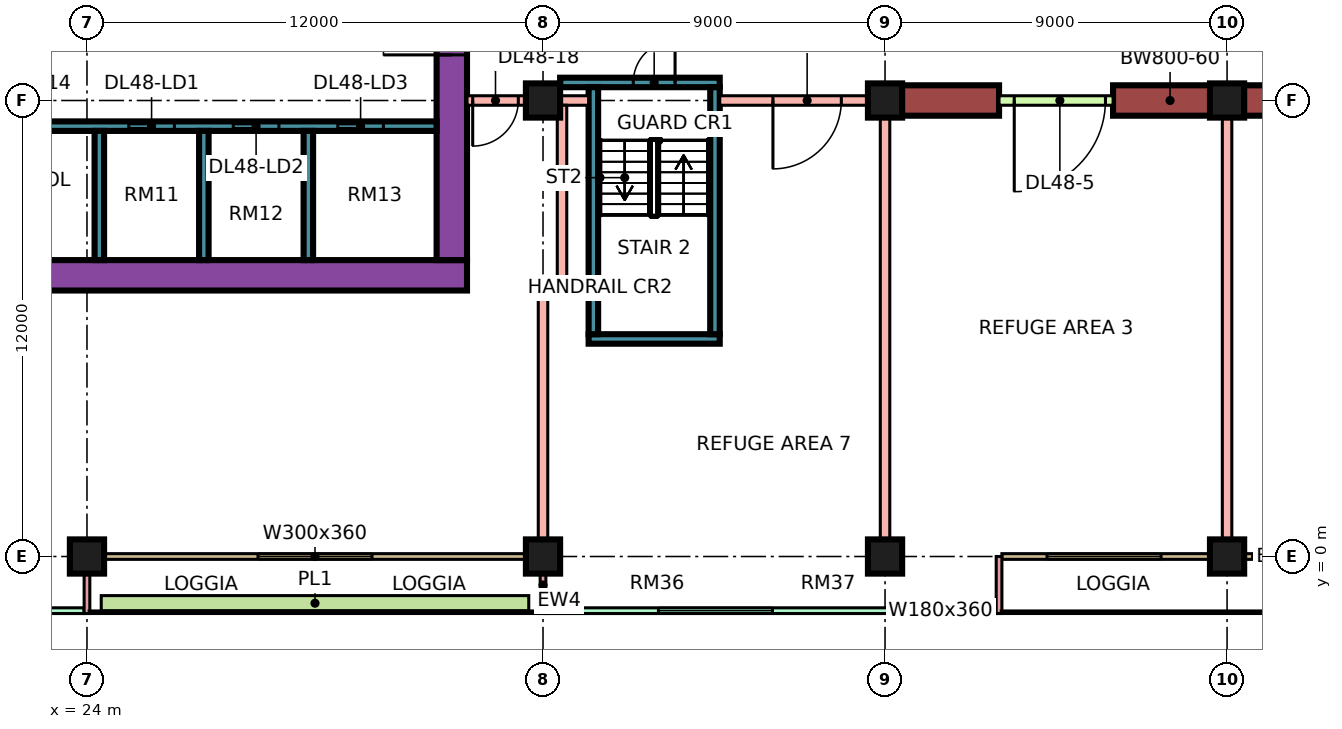
"""IFC4 building model, lengths in metres.
Left out: names, types, materials, properties, quantities, classifications, styles, units other than length and angle.
Written with IfcOpenShell. Run it as: python <this file> out.ifc"""

import sys

from ifc_helpers import new_model, si_unit, direction, frame, frame_2d, origin, origin_2d, place, context, subcontext, project, spatial, rectangle, extrude, element, fill, save


model = new_model("IFC4")
c1 = context("Model", 3, precision=1e-05, world=origin(), true_north=direction((0.0, 1.0)))
c2 = subcontext(c1, "Body", "Model", "MODEL_VIEW")
j1 = project(units=[si_unit("LENGTHUNIT", "METRE"), si_unit("PLANEANGLEUNIT", "RADIAN")], contexts=[c1])
p1 = place(None, origin())
s1 = spatial("IfcSite", under=j1, at=p1, CompositionType="ELEMENT")
p2 = place(p1, origin())
s2 = spatial("IfcBuilding", under=s1, at=p2, CompositionType="ELEMENT")
p3 = place(p2, frame((0.0, 0.0, 206.15)))
s3 = spatial("IfcBuildingStorey", under=s2, at=p3, CompositionType="ELEMENT", Elevation=206.15)
for number, where, z_axis, x_axis in (
    (1, (24.0, 0.0, 0.0), (0.0, 0.0, 1.0), (1.0, 0.0, 0.0)),
    (2, (36.0, 0.0, 0.0), (0.0, 0.0, 1.0), (1.0, 0.0, 0.0)),
    (3, (36.0, 12.0, 0.0), (0.0, 0.0, 1.0), (1.0, 0.0, 0.0)),
    (4, (45.0, 0.0, 0.0), (0.0, 0.0, 1.0), (1.0, 0.0, 0.0)),
):
    element("IfcColumn", number, at=place(p3, frame(where, z_axis=z_axis, x_axis=x_axis)), inside=s3, PredefinedType="COLUMN", context=c2, shape_type="SweptSolid", body=[
        extrude(rectangle(XDim=0.9, YDim=0.9, at=origin_2d()), origin(), (0.0, 0.0, 1.0), 5.5),
    ])
p4 = place(p3, frame((45.0, 12.0, 0.0), z_axis=(0.0, 0.0, 1.0), x_axis=(1.0, 0.0, 0.0)))
e5 = element("IfcColumn", 5, at=p4, inside=s3, PredefinedType="COLUMN", context=c2, shape_type="SweptSolid", body=[
    extrude(rectangle(XDim=0.9, YDim=0.9, at=origin_2d()), origin(), (0.0, 0.0, 1.0), 5.5),
])
p5 = place(p3, frame((54.0, 0.0, 0.0), z_axis=(0.0, 0.0, 1.0), x_axis=(1.0, 0.0, 0.0)))
e6 = element("IfcColumn", 6, at=p5, inside=s3, PredefinedType="COLUMN", context=c2, shape_type="SweptSolid", body=[
    extrude(rectangle(XDim=0.9, YDim=0.9, at=origin_2d()), origin(), (0.0, 0.0, 1.0), 5.5),
])
p6 = place(p3, frame((54.0, 12.0, 0.0), z_axis=(0.0, 0.0, 1.0), x_axis=(1.0, 0.0, 0.0)))
e7 = element("IfcColumn", 7, at=p6, inside=s3, PredefinedType="COLUMN", context=c2, shape_type="SweptSolid", body=[
    extrude(rectangle(XDim=0.9, YDim=0.9, at=origin_2d()), origin(), (0.0, 0.0, 1.0), 5.5),
])
p7 = place(p3, frame((9.0, 7.4, 0.0), z_axis=(0.0, 0.0, 1.0), x_axis=(1.0, 0.0, 0.0)))
e8 = element("IfcWall", 8, at=p7, inside=s3, PredefinedType="SHEAR", context=c2, shape_type="SweptSolid", body=[
    extrude(rectangle(XDim=25.0, YDim=0.8, at=frame_2d((12.5, 0.0))), origin(), (0.0, 0.0, 1.0), 5.5),
])
p8 = place(p3, frame((33.6, 7.8, 0.0), z_axis=(0.0, 0.0, 1.0), x_axis=(0.0, 1.0, 0.0)))
e9 = element("IfcWall", 9, at=p8, inside=s3, PredefinedType="SHEAR", context=c2, shape_type="SweptSolid", body=[
    extrude(rectangle(XDim=11.4, YDim=0.8, at=frame_2d((5.7, 0.0))), origin(), (0.0, 0.0, 1.0), 5.5),
])
p9 = place(p8, frame((5.4, 0.0, 0.0)))
e10 = element("IfcOpeningElement", 10, at=p9, cuts=e9, PredefinedType="OPENING", context=c2, shape_type="SweptSolid", body=[
    extrude(rectangle(XDim=1.8, YDim=2.4, at=frame_2d((0.9, 1.2))), frame((0.0, 0.41, 0.0), z_axis=(0.0, -1.0, 0.0), x_axis=(1.0, 0.0, 0.0)), (0.0, 0.0, 1.0), 0.82),
])
p10 = place(p3, frame((13.45, 11.325, 0.0), z_axis=(0.0, 0.0, 1.0), x_axis=(1.0, 0.0, 0.0)))
e11 = element("IfcWall", 11, at=p10, inside=s3, PredefinedType="SHEAR", context=c2, shape_type="SweptSolid", body=[
    extrude(rectangle(XDim=19.75, YDim=0.25, at=frame_2d((9.875, 0.0))), origin(), (0.0, 0.0, 1.0), 5.5),
])
p11 = place(p10, frame((11.65, 0.0, 0.0)))
e12 = element("IfcOpeningElement", 12, at=p11, cuts=e11, PredefinedType="OPENING", context=c2, shape_type="SweptSolid", body=[
    extrude(rectangle(XDim=1.2, YDim=2.2, at=frame_2d((0.6, 1.1))), frame((0.0, 0.135, 0.0), z_axis=(0.0, -1.0, 0.0), x_axis=(1.0, 0.0, 0.0)), (0.0, 0.0, 1.0), 0.27),
])
p12 = place(p10, frame((14.4, 0.0, 0.0)))
e13 = element("IfcOpeningElement", 13, at=p12, cuts=e11, PredefinedType="OPENING", context=c2, shape_type="SweptSolid", body=[
    extrude(rectangle(XDim=1.2, YDim=2.2, at=frame_2d((0.6, 1.1))), frame((0.0, 0.135, 0.0), z_axis=(0.0, -1.0, 0.0), x_axis=(1.0, 0.0, 0.0)), (0.0, 0.0, 1.0), 0.27),
])
p13 = place(p10, frame((17.15, 0.0, 0.0)))
e14 = element("IfcOpeningElement", 14, at=p13, cuts=e11, PredefinedType="OPENING", context=c2, shape_type="SweptSolid", body=[
    extrude(rectangle(XDim=1.2, YDim=2.2, at=frame_2d((0.6, 1.1))), frame((0.0, 0.135, 0.0), z_axis=(0.0, -1.0, 0.0), x_axis=(1.0, 0.0, 0.0)), (0.0, 0.0, 1.0), 0.27),
])
p14 = place(p10, frame((1.55, 0.0, 0.0)))
e15 = element("IfcOpeningElement", 15, at=p14, cuts=e11, PredefinedType="OPENING", context=c2, shape_type="SweptSolid", body=[
    extrude(rectangle(XDim=0.9, YDim=2.1, at=frame_2d((0.45, 1.05))), frame((0.0, 0.135, 0.0), z_axis=(0.0, -1.0, 0.0), x_axis=(1.0, 0.0, 0.0)), (0.0, 0.0, 1.0), 0.27),
])
p15 = place(p10, frame((5.05, 0.0, 0.0)))
e16 = element("IfcOpeningElement", 16, at=p15, cuts=e11, PredefinedType="OPENING", context=c2, shape_type="SweptSolid", body=[
    extrude(rectangle(XDim=0.9, YDim=2.1, at=frame_2d((0.45, 1.05))), frame((0.0, 0.135, 0.0), z_axis=(0.0, -1.0, 0.0), x_axis=(1.0, 0.0, 0.0)), (0.0, 0.0, 1.0), 0.27),
])
p16 = place(p10, frame((8.425, 0.0, 0.0)))
e17 = element("IfcOpeningElement", 17, at=p16, cuts=e11, PredefinedType="OPENING", context=c2, shape_type="SweptSolid", body=[
    extrude(rectangle(XDim=0.9, YDim=2.1, at=frame_2d((0.45, 1.05))), frame((0.0, 0.135, 0.0), z_axis=(0.0, -1.0, 0.0), x_axis=(1.0, 0.0, 0.0)), (0.0, 0.0, 1.0), 0.27),
])
for number, where, z_axis, x_axis in (
    (18, (24.325, 7.8, 0.0), (0.0, 0.0, 1.0), (0.0, 1.0, 0.0)),
    (19, (27.075, 7.8, 0.0), (0.0, 0.0, 1.0), (0.0, 1.0, 0.0)),
    (20, (29.825, 7.8, 0.0), (0.0, 0.0, 1.0), (0.0, 1.0, 0.0)),
):
    element("IfcWall", number, at=place(p3, frame(where, z_axis=z_axis, x_axis=x_axis)), inside=s3, PredefinedType="SHEAR", context=c2, shape_type="SweptSolid", body=[
        extrude(rectangle(XDim=3.4, YDim=0.25, at=frame_2d((1.7, 0.0))), origin(), (0.0, 0.0, 1.0), 5.5),
    ])
p17 = place(p3, frame((37.2, 5.725, 0.0), z_axis=(0.0, 0.0, 1.0), x_axis=(1.0, 0.0, 0.0)))
e21 = element("IfcWall", 21, at=p17, inside=s3, PredefinedType="SHEAR", context=c2, shape_type="SweptSolid", body=[
    extrude(rectangle(XDim=3.45, YDim=0.25, at=frame_2d((1.725, 0.0))), origin(), (0.0, 0.0, 1.0), 5.5),
])
p18 = place(p3, frame((36.45, 12.475, 0.0), z_axis=(0.0, 0.0, 1.0), x_axis=(1.0, 0.0, 0.0)))
e22 = element("IfcWall", 22, at=p18, inside=s3, PredefinedType="SHEAR", context=c2, shape_type="SweptSolid", body=[
    extrude(rectangle(XDim=4.2, YDim=0.25, at=frame_2d((2.1, 0.0))), origin(), (0.0, 0.0, 1.0), 5.5),
])
p19 = place(p18, frame((1.925, 0.0, 0.0)))
e23 = element("IfcOpeningElement", 23, at=p19, cuts=e22, PredefinedType="OPENING", context=c2, shape_type="SweptSolid", body=[
    extrude(rectangle(XDim=1.1, YDim=2.2, at=frame_2d((0.55, 1.1))), frame((0.0, 0.135, 0.0), z_axis=(0.0, -1.0, 0.0), x_axis=(1.0, 0.0, 0.0)), (0.0, 0.0, 1.0), 0.27),
])
for number, where, z_axis, x_axis in (
    (24, (37.325, 5.85, 0.0), (0.0, 0.0, 1.0), (0.0, 1.0, 0.0)),
    (25, (40.525, 5.85, 0.0), (0.0, 0.0, 1.0), (0.0, 1.0, 0.0)),
):
    element("IfcWall", number, at=place(p3, frame(where, z_axis=z_axis, x_axis=x_axis)), inside=s3, PredefinedType="SHEAR", context=c2, shape_type="SweptSolid", body=[
        extrude(rectangle(XDim=6.5, YDim=0.25, at=frame_2d((3.25, 0.0))), origin(), (0.0, 0.0, 1.0), 5.5),
    ])
e26 = element("IfcWall", 26, at=p4, inside=s3, PredefinedType="SHEAR", context=c2, shape_type="SweptSolid", body=[
    extrude(rectangle(XDim=3.0, YDim=0.8, at=frame_2d((1.5, 0.0))), origin(), (0.0, 0.0, 1.0), 5.1),
])
p20 = place(p3, frame((51.0, 12.0, 0.0), z_axis=(0.0, 0.0, 1.0), x_axis=(1.0, 0.0, 0.0)))
e27 = element("IfcWall", 27, at=p20, inside=s3, PredefinedType="SHEAR", context=c2, shape_type="SweptSolid", body=[
    extrude(rectangle(XDim=3.0, YDim=0.8, at=frame_2d((1.5, 0.0))), origin(), (0.0, 0.0, 1.0), 5.1),
])
e28 = element("IfcWall", 28, at=p6, inside=s3, PredefinedType="SHEAR", context=c2, shape_type="SweptSolid", body=[
    extrude(rectangle(XDim=3.0, YDim=0.8, at=frame_2d((1.5, 0.0))), origin(), (0.0, 0.0, 1.0), 5.1),
])
p21 = place(p3, frame((12.5, -1.425, 0.0), z_axis=(0.0, 0.0, 1.0), x_axis=(1.0, 0.0, 0.0)))
e29 = element("IfcWall", 29, at=p21, inside=s3, PredefinedType="SOLIDWALL", context=c2, shape_type="SweptSolid", body=[
    extrude(rectangle(XDim=11.425, YDim=0.15, at=frame_2d((5.712, 0.0))), origin(), (0.0, 0.0, 1.0), 5.1),
])
p22 = place(p21, frame((4.212, 0.0, 0.45)))
e30 = element("IfcOpeningElement", 30, at=p22, cuts=e29, PredefinedType="OPENING", context=c2, shape_type="SweptSolid", body=[
    extrude(rectangle(XDim=3.0, YDim=3.6, at=frame_2d((1.5, 1.8))), frame((0.0, 0.085, 0.0), z_axis=(0.0, -1.0, 0.0), x_axis=(1.0, 0.0, 0.0)), (0.0, 0.0, 1.0), 0.17),
])
p23 = place(p3, frame((24.075, 0.0, 0.0), z_axis=(0.0, 0.0, 1.0), x_axis=(1.0, 0.0, 0.0)))
e31 = element("IfcWall", 31, at=p23, inside=s3, PredefinedType="SOLIDWALL", context=c2, shape_type="SweptSolid", body=[
    extrude(rectangle(XDim=11.85, YDim=0.15, at=frame_2d((5.925, 0.0))), origin(), (0.0, 0.0, 1.0), 5.1),
])
p24 = place(p23, frame((4.425, 0.0, 0.45)))
e32 = element("IfcOpeningElement", 32, at=p24, cuts=e31, PredefinedType="OPENING", context=c2, shape_type="SweptSolid", body=[
    extrude(rectangle(XDim=3.0, YDim=3.6, at=frame_2d((1.5, 1.8))), frame((0.0, 0.085, 0.0), z_axis=(0.0, -1.0, 0.0), x_axis=(1.0, 0.0, 0.0)), (0.0, 0.0, 1.0), 0.17),
])
for number, where, z_axis, x_axis in (
    (33, (24.0, -1.5, 0.0), (0.0, 0.0, 1.0), (0.0, 1.0, 0.0)),
    (34, (36.0, -1.5, 0.0), (0.0, 0.0, 1.0), (0.0, 1.0, 0.0)),
):
    element("IfcWall", number, at=place(p3, frame(where, z_axis=z_axis, x_axis=x_axis)), inside=s3, PredefinedType="SOLIDWALL", context=c2, shape_type="SweptSolid", body=[
        extrude(rectangle(XDim=1.5, YDim=0.15, at=frame_2d((0.75, 0.0))), origin(), (0.0, 0.0, 1.0), 5.1),
    ])
p25 = place(p3, frame((36.075, -1.425, 0.0), z_axis=(0.0, 0.0, 1.0), x_axis=(1.0, 0.0, 0.0)))
e35 = element("IfcWall", 35, at=p25, inside=s3, PredefinedType="SOLIDWALL", context=c2, shape_type="SweptSolid", body=[
    extrude(rectangle(XDim=11.85, YDim=0.15, at=frame_2d((5.925, 0.0))), origin(), (0.0, 0.0, 1.0), 5.1),
])
p26 = place(p25, frame((2.962, 0.0, 0.45)))
e36 = element("IfcOpeningElement", 36, at=p26, cuts=e35, PredefinedType="OPENING", context=c2, shape_type="SweptSolid", body=[
    extrude(rectangle(XDim=3.0, YDim=3.6, at=frame_2d((1.5, 1.8))), frame((0.0, 0.085, 0.0), z_axis=(0.0, -1.0, 0.0), x_axis=(1.0, 0.0, 0.0)), (0.0, 0.0, 1.0), 0.17),
])
p27 = place(p25, frame((9.488, 0.0, 0.45)))
e37 = element("IfcOpeningElement", 37, at=p27, cuts=e35, PredefinedType="OPENING", context=c2, shape_type="SweptSolid", body=[
    extrude(rectangle(XDim=1.8, YDim=3.6, at=frame_2d((0.9, 1.8))), frame((0.0, 0.085, 0.0), z_axis=(0.0, -1.0, 0.0), x_axis=(1.0, 0.0, 0.0)), (0.0, 0.0, 1.0), 0.17),
])
p28 = place(p3, frame((48.075, 0.0, 0.0), z_axis=(0.0, 0.0, 1.0), x_axis=(1.0, 0.0, 0.0)))
e38 = element("IfcWall", 38, at=p28, inside=s3, PredefinedType="SOLIDWALL", context=c2, shape_type="SweptSolid", body=[
    extrude(rectangle(XDim=13.35, YDim=0.15, at=frame_2d((6.675, 0.0))), origin(), (0.0, 0.0, 1.0), 5.1),
])
p29 = place(p28, frame((1.188, 0.0, 0.45)))
e39 = element("IfcOpeningElement", 39, at=p29, cuts=e38, PredefinedType="OPENING", context=c2, shape_type="SweptSolid", body=[
    extrude(rectangle(XDim=3.0, YDim=3.6, at=frame_2d((1.5, 1.8))), frame((0.0, 0.085, 0.0), z_axis=(0.0, -1.0, 0.0), x_axis=(1.0, 0.0, 0.0)), (0.0, 0.0, 1.0), 0.17),
])
p30 = place(p28, frame((8.413, 0.0, 0.45)))
e40 = element("IfcOpeningElement", 40, at=p30, cuts=e38, PredefinedType="OPENING", context=c2, shape_type="SweptSolid", body=[
    extrude(rectangle(XDim=3.0, YDim=3.6, at=frame_2d((1.5, 1.8))), frame((0.0, 0.085, 0.0), z_axis=(0.0, -1.0, 0.0), x_axis=(1.0, 0.0, 0.0)), (0.0, 0.0, 1.0), 0.17),
])
p31 = place(p3, frame((48.0, -1.5, 0.0), z_axis=(0.0, 0.0, 1.0), x_axis=(0.0, 1.0, 0.0)))
e41 = element("IfcWall", 41, at=p31, inside=s3, PredefinedType="SOLIDWALL", context=c2, shape_type="SweptSolid", body=[
    extrude(rectangle(XDim=1.5, YDim=0.15, at=frame_2d((0.75, 0.0))), origin(), (0.0, 0.0, 1.0), 5.1),
])
p32 = place(p3, frame((24.375, -1.229, 0.0), z_axis=(0.0, 0.0, 1.0), x_axis=(1.0, 0.0, 0.0)))
e42 = element("IfcWall", 42, at=p32, inside=s3, PredefinedType="SOLIDWALL", context=c2, shape_type="SweptSolid", body=[
    extrude(rectangle(XDim=11.25, YDim=0.4, at=frame_2d((5.625, 0.0))), origin(), (0.0, 0.0, 1.0), 0.7),
])
p33 = place(p3, frame((34.0, 12.0, 0.0), z_axis=(0.0, 0.0, 1.0), x_axis=(1.0, 0.0, 0.0)))
e43 = element("IfcWall", 43, at=p33, inside=s3, PredefinedType="PARTITIONING", context=c2, shape_type="SweptSolid", body=[
    extrude(rectangle(XDim=3.2, YDim=0.25, at=frame_2d((1.6, 0.0))), origin(), (0.0, 0.0, 1.0), 5.1),
])
p34 = place(p33, frame((0.15, 0.0, 0.0)))
e44 = element("IfcOpeningElement", 44, at=p34, cuts=e43, PredefinedType="OPENING", context=c2, shape_type="SweptSolid", body=[
    extrude(rectangle(XDim=1.2, YDim=2.1, at=frame_2d((0.6, 1.05))), frame((0.0, 0.135, 0.0), z_axis=(0.0, -1.0, 0.0), x_axis=(1.0, 0.0, 0.0)), (0.0, 0.0, 1.0), 0.27),
])
p35 = place(p3, frame((36.0, 0.0, 0.0), z_axis=(0.0, 0.0, 1.0), x_axis=(0.0, 1.0, 0.0)))
e45 = element("IfcWall", 45, at=p35, inside=s3, PredefinedType="PARTITIONING", context=c2, shape_type="SweptSolid", body=[
    extrude(rectangle(XDim=7.125, YDim=0.25, at=frame_2d((3.562, 0.0))), origin(), (0.0, 0.0, 1.0), 5.1),
])
p36 = place(p3, frame((36.125, 7.0, 0.0), z_axis=(0.0, 0.0, 1.0), x_axis=(1.0, 0.0, 0.0)))
e46 = element("IfcWall", 46, at=p36, inside=s3, PredefinedType="PARTITIONING", context=c2, shape_type="SweptSolid", body=[
    extrude(rectangle(XDim=0.25, YDim=0.25, at=frame_2d((0.125, 0.0))), origin(), (0.0, 0.0, 1.0), 5.1),
])
p37 = place(p3, frame((36.5, 6.875, 0.0), z_axis=(0.0, 0.0, 1.0), x_axis=(0.0, 1.0, 0.0)))
e47 = element("IfcWall", 47, at=p37, inside=s3, PredefinedType="PARTITIONING", context=c2, shape_type="SweptSolid", body=[
    extrude(rectangle(XDim=5.0, YDim=0.25, at=frame_2d((2.5, 0.0))), origin(), (0.0, 0.0, 1.0), 5.1),
])
p38 = place(p3, frame((40.65, 12.0, 0.0), z_axis=(0.0, 0.0, 1.0), x_axis=(1.0, 0.0, 0.0)))
e48 = element("IfcWall", 48, at=p38, inside=s3, PredefinedType="PARTITIONING", context=c2, shape_type="SweptSolid", body=[
    extrude(rectangle(XDim=4.225, YDim=0.25, at=frame_2d((2.113, 0.0))), origin(), (0.0, 0.0, 1.0), 5.1),
])
p39 = place(p38, frame((1.4, 0.0, 0.0)))
e49 = element("IfcOpeningElement", 49, at=p39, cuts=e48, PredefinedType="OPENING", context=c2, shape_type="SweptSolid", body=[
    extrude(rectangle(XDim=1.8, YDim=2.1, at=frame_2d((0.9, 1.05))), frame((0.0, 0.135, 0.0), z_axis=(0.0, -1.0, 0.0), x_axis=(1.0, 0.0, 0.0)), (0.0, 0.0, 1.0), 0.27),
])
p40 = place(p3, frame((45.0, 0.0, 0.0), z_axis=(0.0, 0.0, 1.0), x_axis=(0.0, 1.0, 0.0)))
e50 = element("IfcWall", 50, at=p40, inside=s3, PredefinedType="PARTITIONING", context=c2, shape_type="SweptSolid", body=[
    extrude(rectangle(XDim=12.125, YDim=0.25, at=frame_2d((6.062, 0.0))), origin(), (0.0, 0.0, 1.0), 5.1),
])
p41 = place(p3, frame((47.999, 12.0, 0.0), z_axis=(0.0, 0.0, 1.0), x_axis=(1.0, 0.0, 0.0)))
e51 = element("IfcWall", 51, at=p41, inside=s3, PredefinedType="PARTITIONING", context=c2, shape_type="SweptSolid", body=[
    extrude(rectangle(XDim=3.002, YDim=0.25, at=frame_2d((1.501, 0.0))), origin(), (0.0, 0.0, 1.0), 3.05),
])
p42 = place(p41, frame((0.401, 0.0, 0.0)))
e52 = element("IfcOpeningElement", 52, at=p42, cuts=e51, PredefinedType="OPENING", context=c2, shape_type="SweptSolid", body=[
    extrude(rectangle(XDim=2.4, YDim=2.1, at=frame_2d((1.2, 1.05))), frame((0.0, 0.135, 0.0), z_axis=(0.0, -1.0, 0.0), x_axis=(1.0, 0.0, 0.0)), (0.0, 0.0, 1.0), 0.27),
])
p43 = place(p3, frame((54.0, 0.074, 0.0), z_axis=(0.0, 0.0, 1.0), x_axis=(0.0, 1.0, 0.0)))
e53 = element("IfcWall", 53, at=p43, inside=s3, PredefinedType="PARTITIONING", context=c2, shape_type="SweptSolid", body=[
    extrude(rectangle(XDim=11.527, YDim=0.25, at=frame_2d((5.764, 0.0))), origin(), (0.0, 0.0, 1.0), 5.1),
])
p44 = place(p24, origin())
e54 = element("IfcWindow", 54, at=p44, inside=s3, PartitioningType="SINGLE_PANEL", PredefinedType="WINDOW", context=c2, shape_type="SweptSolid", body=[
    extrude(rectangle(XDim=3.0, YDim=3.6, at=frame_2d((1.5, 1.8))), frame((0.0, 0.03, 0.0), z_axis=(0.0, -1.0, 0.0), x_axis=(1.0, 0.0, 0.0)), (0.0, 0.0, 1.0), 0.06),
])
fill(e32, e54)
p45 = place(p26, origin())
e55 = element("IfcWindow", 55, at=p45, inside=s3, PartitioningType="SINGLE_PANEL", PredefinedType="WINDOW", context=c2, shape_type="SweptSolid", body=[
    extrude(rectangle(XDim=3.0, YDim=3.6, at=frame_2d((1.5, 1.8))), frame((0.0, 0.03, 0.0), z_axis=(0.0, -1.0, 0.0), x_axis=(1.0, 0.0, 0.0)), (0.0, 0.0, 1.0), 0.06),
])
fill(e36, e55)
p46 = place(p27, origin())
e56 = element("IfcWindow", 56, at=p46, inside=s3, PartitioningType="SINGLE_PANEL", PredefinedType="WINDOW", context=c2, shape_type="SweptSolid", body=[
    extrude(rectangle(XDim=1.8, YDim=3.6, at=frame_2d((0.9, 1.8))), frame((0.0, 0.03, 0.0), z_axis=(0.0, -1.0, 0.0), x_axis=(1.0, 0.0, 0.0)), (0.0, 0.0, 1.0), 0.06),
])
fill(e37, e56)
p47 = place(p29, origin())
e57 = element("IfcWindow", 57, at=p47, inside=s3, PartitioningType="SINGLE_PANEL", PredefinedType="WINDOW", context=c2, shape_type="SweptSolid", body=[
    extrude(rectangle(XDim=3.0, YDim=3.6, at=frame_2d((1.5, 1.8))), frame((0.0, 0.03, 0.0), z_axis=(0.0, -1.0, 0.0), x_axis=(1.0, 0.0, 0.0)), (0.0, 0.0, 1.0), 0.06),
])
fill(e39, e57)
p48 = place(p11, origin())
e58 = element("IfcDoor", 58, at=p48, inside=s3, OperationType="DOUBLE_DOOR_SLIDING", PredefinedType="DOOR", context=c2, shape_type="SweptSolid", body=[
    extrude(rectangle(XDim=1.2, YDim=2.2, at=frame_2d((0.6, 1.1))), frame((0.0, 0.025, 0.0), z_axis=(0.0, -1.0, 0.0), x_axis=(1.0, 0.0, 0.0)), (0.0, 0.0, 1.0), 0.05),
])
fill(e12, e58)
p49 = place(p12, origin())
e59 = element("IfcDoor", 59, at=p49, inside=s3, OperationType="DOUBLE_DOOR_SLIDING", PredefinedType="DOOR", context=c2, shape_type="SweptSolid", body=[
    extrude(rectangle(XDim=1.2, YDim=2.2, at=frame_2d((0.6, 1.1))), frame((0.0, 0.025, 0.0), z_axis=(0.0, -1.0, 0.0), x_axis=(1.0, 0.0, 0.0)), (0.0, 0.0, 1.0), 0.05),
])
fill(e13, e59)
p50 = place(p13, origin())
e60 = element("IfcDoor", 60, at=p50, inside=s3, OperationType="DOUBLE_DOOR_SLIDING", PredefinedType="DOOR", context=c2, shape_type="SweptSolid", body=[
    extrude(rectangle(XDim=1.2, YDim=2.2, at=frame_2d((0.6, 1.1))), frame((0.0, 0.025, 0.0), z_axis=(0.0, -1.0, 0.0), x_axis=(1.0, 0.0, 0.0)), (0.0, 0.0, 1.0), 0.05),
])
fill(e14, e60)
p51 = place(p9, origin())
e61 = element("IfcDoor", 61, at=p51, inside=s3, OperationType="DOUBLE_DOOR_SINGLE_SWING", PredefinedType="DOOR", context=c2, shape_type="SweptSolid", body=[
    extrude(rectangle(XDim=1.8, YDim=2.4, at=frame_2d((0.9, 1.2))), frame((0.0, 0.025, 0.0), z_axis=(0.0, -1.0, 0.0), x_axis=(1.0, 0.0, 0.0)), (0.0, 0.0, 1.0), 0.05),
])
fill(e10, e61)
p52 = place(p19, frame((1.1, 0.0, 0.0), z_axis=(0.0, 0.0, 1.0), x_axis=(-1.0, 0.0, 0.0)))
e62 = element("IfcDoor", 62, at=p52, inside=s3, OperationType="SINGLE_SWING_RIGHT", PredefinedType="DOOR", context=c2, shape_type="SweptSolid", body=[
    extrude(rectangle(XDim=1.1, YDim=2.2, at=frame_2d((0.55, 1.1))), frame((0.0, 0.025, 0.0), z_axis=(0.0, -1.0, 0.0), x_axis=(1.0, 0.0, 0.0)), (0.0, 0.0, 1.0), 0.05),
])
fill(e23, e62)
p53 = place(p39, frame((1.8, 0.0, 0.0), z_axis=(0.0, 0.0, 1.0), x_axis=(-1.0, 0.0, 0.0)))
e63 = element("IfcDoor", 63, at=p53, inside=s3, OperationType="DOUBLE_DOOR_SINGLE_SWING", PredefinedType="DOOR", context=c2, shape_type="SweptSolid", body=[
    extrude(rectangle(XDim=1.8, YDim=2.1, at=frame_2d((0.9, 1.05))), frame((0.0, 0.025, 0.0), z_axis=(0.0, -1.0, 0.0), x_axis=(1.0, 0.0, 0.0)), (0.0, 0.0, 1.0), 0.05),
])
fill(e49, e63)
p54 = place(p42, frame((2.4, 0.0, 0.0), z_axis=(0.0, 0.0, 1.0), x_axis=(-1.0, 0.0, 0.0)))
e64 = element("IfcDoor", 64, at=p54, inside=s3, OperationType="DOUBLE_DOOR_SINGLE_SWING", PredefinedType="DOOR", context=c2, shape_type="SweptSolid", body=[
    extrude(rectangle(XDim=2.4, YDim=2.1, at=frame_2d((1.2, 1.05))), frame((0.0, 0.025, 0.0), z_axis=(0.0, -1.0, 0.0), x_axis=(1.0, 0.0, 0.0)), (0.0, 0.0, 1.0), 0.05),
])
fill(e52, e64)
p55 = place(p34, frame((1.2, 0.0, 0.0), z_axis=(0.0, 0.0, 1.0), x_axis=(-1.0, 0.0, 0.0)))
e65 = element("IfcDoor", 65, at=p55, inside=s3, OperationType="SINGLE_SWING_LEFT", PredefinedType="DOOR", context=c2, shape_type="SweptSolid", body=[
    extrude(rectangle(XDim=1.2, YDim=2.1, at=frame_2d((0.6, 1.05))), frame((0.0, 0.025, 0.0), z_axis=(0.0, -1.0, 0.0), x_axis=(1.0, 0.0, 0.0)), (0.0, 0.0, 1.0), 0.05),
])
fill(e44, e65)
save(model, sys.argv[1])
